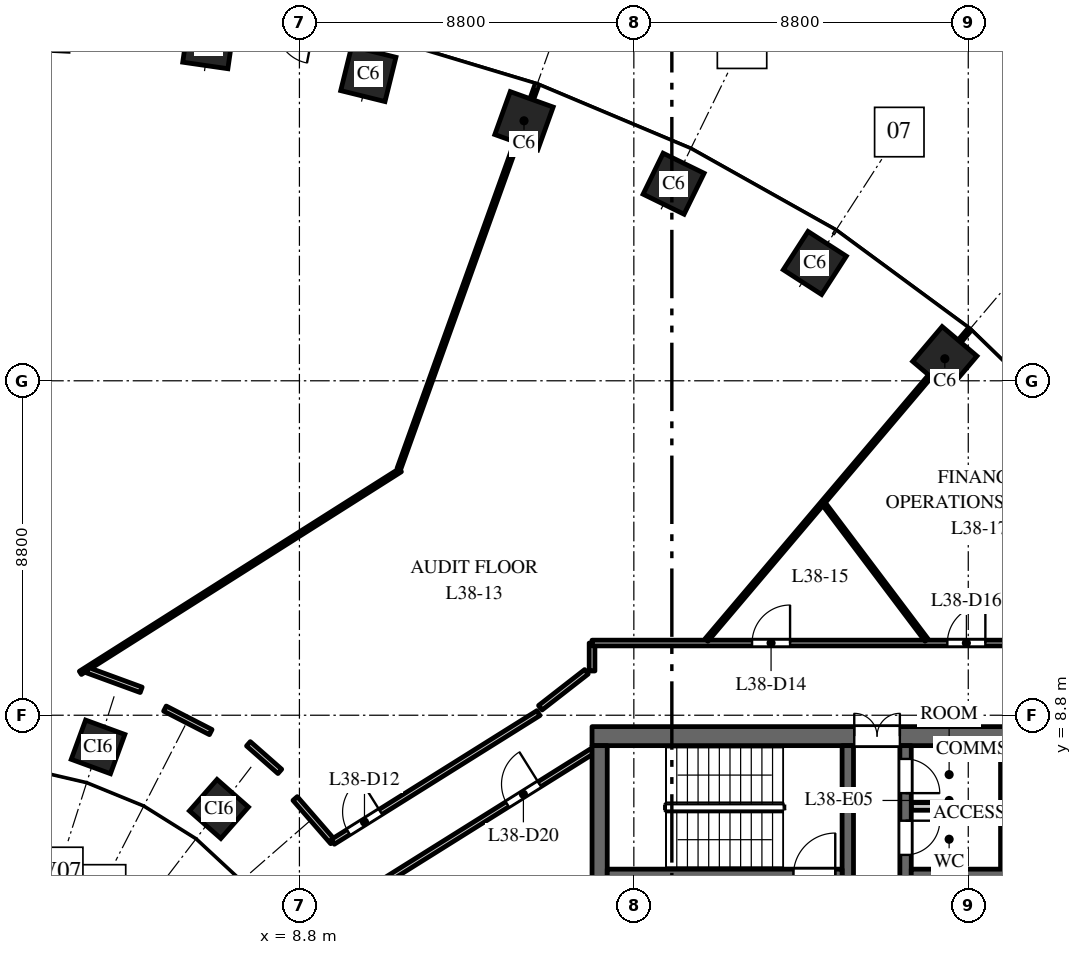
"""IFC4 building model, lengths in metres.
Left out: names, types, materials, properties, quantities, classifications, styles, units other than length and angle.
Written with IfcOpenShell. Run it as: python <this file> out.ifc"""

import sys

from ifc_helpers import new_model, si_unit, direction, frame, frame_2d, origin, origin_2d, place, context, subcontext, project, spatial, rectangle, extrude, element, fill, save


model = new_model("IFC4")
c1 = context("Model", 3, precision=1e-05, world=origin(), true_north=direction((0.0, 1.0)))
c2 = subcontext(c1, "Body", "Model", "MODEL_VIEW")
j1 = project(units=[si_unit("LENGTHUNIT", "METRE"), si_unit("PLANEANGLEUNIT", "RADIAN")], contexts=[c1])
p1 = place(None, origin())
s1 = spatial("IfcSite", under=j1, at=p1, CompositionType="ELEMENT")
p2 = place(p1, origin())
s2 = spatial("IfcBuilding", under=s1, at=p2, CompositionType="ELEMENT")
p3 = place(p2, frame((0.0, 0.0, 166.0)))
s3 = spatial("IfcBuildingStorey", under=s2, at=p3, CompositionType="ELEMENT", Elevation=166.0)
for number, where, z_axis, x_axis in (
    (1, (25.783, 18.18, 0.0), (0.0, 0.0, 1.0), (-0.763, 0.646, 0.0)),
    (2, (22.362, 20.7, 0.0), (0.0, 0.0, 1.0), (-0.84, 0.542, 0.0)),
    (3, (18.646, 22.785, 0.0), (0.0, 0.0, 1.0), (-0.898, 0.439, 0.0)),
    (4, (14.709, 24.441, 0.0), (0.0, 0.0, 1.0), (-0.941, 0.338, 0.0)),
    (5, (10.613, 25.674, 0.0), (0.0, 0.0, 1.0), (-0.971, 0.24, 0.0)),
    (6, (6.409, 26.491, 0.0), (0.0, 0.0, 1.0), (-0.99, 0.143, 0.0)),
):
    element("IfcColumn", number, at=place(p3, frame(where, z_axis=z_axis, x_axis=x_axis)), inside=s3, PredefinedType="COLUMN", context=c2, shape_type="SweptSolid", body=[
        extrude(rectangle(XDim=1.2, YDim=1.2, at=origin_2d()), origin(), (0.0, 0.0, 1.0), 4.0),
    ])
for number, where, z_axis, x_axis in (
    (7, (6.682, 6.334, 0.0), (0.0, 0.0, 1.0), (-0.751, 0.66, 0.0)),
    (8, (3.501, 7.967, 0.0), (0.0, 0.0, 1.0), (-0.939, 0.344, 0.0)),
):
    element("IfcColumn", number, at=place(p3, frame(where, z_axis=z_axis, x_axis=x_axis)), inside=s3, PredefinedType="COLUMN", context=c2, shape_type="SweptSolid", body=[
        extrude(rectangle(XDim=1.1, YDim=1.1, at=origin_2d()), origin(), (0.0, 0.0, 1.0), 4.0),
    ])
p4 = place(p3, frame((16.5, 8.25, 0.0), z_axis=(0.0, 0.0, 1.0), x_axis=(1.0, 0.0, 0.0)))
e9 = element("IfcWall", 9, at=p4, inside=s3, PredefinedType="SHEAR", context=c2, shape_type="SweptSolid", body=[
    extrude(rectangle(XDim=15.0, YDim=0.5, at=frame_2d((7.5, 0.0))), origin(), (0.0, 0.0, 1.0), 3.7),
])
p5 = place(p4, frame((6.9, 0.0, 0.0)))
e10 = element("IfcOpeningElement", 10, at=p5, cuts=e9, PredefinedType="OPENING", context=c2, shape_type="SweptSolid", body=[
    extrude(rectangle(XDim=1.2, YDim=2.1, at=frame_2d((0.6, 1.05))), frame((0.0, 0.26, 0.0), z_axis=(0.0, -1.0, 0.0), x_axis=(1.0, 0.0, 0.0)), (0.0, 0.0, 1.0), 0.52),
])
p6 = place(p4, frame((12.275, 0.0, 0.0)))
e11 = element("IfcOpeningElement", 11, at=p6, cuts=e9, PredefinedType="OPENING", context=c2, shape_type="SweptSolid", body=[
    extrude(rectangle(XDim=0.9, YDim=2.1, at=frame_2d((0.45, 1.05))), frame((0.0, 0.26, 0.0), z_axis=(0.0, -1.0, 0.0), x_axis=(1.0, 0.0, 0.0)), (0.0, 0.0, 1.0), 0.52),
])
p7 = place(p3, frame((24.75, -8.0, 0.0), z_axis=(0.0, 0.0, 1.0), x_axis=(0.0, 1.0, 0.0)))
e12 = element("IfcWall", 12, at=p7, inside=s3, PredefinedType="SHEAR", context=c2, shape_type="SweptSolid", body=[
    extrude(rectangle(XDim=16.0, YDim=0.3, at=frame_2d((8.0, 0.0))), origin(), (0.0, 0.0, 1.0), 3.7),
])
p8 = place(p7, frame((4.425, 0.0, 0.0)))
e13 = element("IfcOpeningElement", 13, at=p8, cuts=e12, PredefinedType="OPENING", context=c2, shape_type="SweptSolid", body=[
    extrude(rectangle(XDim=1.1, YDim=2.1, at=frame_2d((0.55, 1.05))), frame((0.0, 0.16, 0.0), z_axis=(0.0, -1.0, 0.0), x_axis=(1.0, 0.0, 0.0)), (0.0, 0.0, 1.0), 0.32),
])
p9 = place(p7, frame((7.45, 0.0, 0.0)))
e14 = element("IfcOpeningElement", 14, at=p9, cuts=e12, PredefinedType="OPENING", context=c2, shape_type="SweptSolid", body=[
    extrude(rectangle(XDim=1.1, YDim=2.1, at=frame_2d((0.55, 1.05))), frame((0.0, 0.16, 0.0), z_axis=(0.0, -1.0, 0.0), x_axis=(1.0, 0.0, 0.0)), (0.0, 0.0, 1.0), 0.32),
])
p10 = place(p7, frame((10.475, 0.0, 0.0)))
e15 = element("IfcOpeningElement", 15, at=p10, cuts=e12, PredefinedType="OPENING", context=c2, shape_type="SweptSolid", body=[
    extrude(rectangle(XDim=1.1, YDim=2.1, at=frame_2d((0.55, 1.05))), frame((0.0, 0.16, 0.0), z_axis=(0.0, -1.0, 0.0), x_axis=(1.0, 0.0, 0.0)), (0.0, 0.0, 1.0), 0.32),
])
p11 = place(p7, frame((13.125, 0.0, 0.0)))
e16 = element("IfcOpeningElement", 16, at=p11, cuts=e12, PredefinedType="OPENING", context=c2, shape_type="SweptSolid", body=[
    extrude(rectangle(XDim=0.9, YDim=2.1, at=frame_2d((0.45, 1.05))), frame((0.0, 0.16, 0.0), z_axis=(0.0, -1.0, 0.0), x_axis=(1.0, 0.0, 0.0)), (0.0, 0.0, 1.0), 0.32),
])
p12 = place(p7, frame((14.75, 0.0, 0.0)))
e17 = element("IfcOpeningElement", 17, at=p12, cuts=e12, PredefinedType="OPENING", context=c2, shape_type="SweptSolid", body=[
    extrude(rectangle(XDim=0.9, YDim=2.1, at=frame_2d((0.45, 1.05))), frame((0.0, 0.16, 0.0), z_axis=(0.0, -1.0, 0.0), x_axis=(1.0, 0.0, 0.0)), (0.0, 0.0, 1.0), 0.32),
])
p13 = place(p7, frame((1.35, 0.0, 0.0)))
e18 = element("IfcOpeningElement", 18, at=p13, cuts=e12, PredefinedType="OPENING", context=c2, shape_type="SweptSolid", body=[
    extrude(rectangle(XDim=0.9, YDim=2.1, at=frame_2d((0.45, 1.05))), frame((0.0, 0.16, 0.0), z_axis=(0.0, -1.0, 0.0), x_axis=(1.0, 0.0, 0.0)), (0.0, 0.0, 1.0), 0.32),
])
p14 = place(p3, frame((16.7, -8.0, 0.0), z_axis=(0.0, 0.0, 1.0), x_axis=(0.0, 1.0, 0.0)))
e19 = element("IfcWall", 19, at=p14, inside=s3, PredefinedType="SHEAR", context=c2, shape_type="SweptSolid", body=[
    extrude(rectangle(XDim=16.0, YDim=0.4, at=frame_2d((8.0, 0.0))), origin(), (0.0, 0.0, 1.0), 3.7),
])
p15 = place(p3, frame((24.9, 4.6, 0.0), z_axis=(0.0, 0.0, 1.0), x_axis=(1.0, 0.0, 0.0)))
e20 = element("IfcWall", 20, at=p15, inside=s3, PredefinedType="SHEAR", context=c2, shape_type="SweptSolid", body=[
    extrude(rectangle(XDim=6.1, YDim=0.3, at=frame_2d((3.05, 0.0))), origin(), (0.0, 0.0, 1.0), 3.7),
])
p16 = place(p15, frame((4.2, 0.0, 0.0)))
e21 = element("IfcOpeningElement", 21, at=p16, cuts=e20, PredefinedType="OPENING", context=c2, shape_type="SweptSolid", body=[
    extrude(rectangle(XDim=0.9, YDim=2.1, at=frame_2d((0.45, 1.05))), frame((0.0, 0.16, 0.0), z_axis=(0.0, -1.0, 0.0), x_axis=(1.0, 0.0, 0.0)), (0.0, 0.0, 1.0), 0.32),
])
p17 = place(p3, frame((27.35, 4.75, 0.0), z_axis=(0.0, 0.0, 1.0), x_axis=(0.0, 1.0, 0.0)))
e22 = element("IfcWall", 22, at=p17, inside=s3, PredefinedType="PARTITIONING", context=c2, shape_type="SweptSolid", body=[
    extrude(rectangle(XDim=3.25, YDim=0.2, at=frame_2d((1.625, 0.0))), origin(), (0.0, 0.0, 1.0), 3.7),
])
p18 = place(p3, frame((24.9, 6.4, 0.0), z_axis=(0.0, 0.0, 1.0), x_axis=(1.0, 0.0, 0.0)))
e23 = element("IfcWall", 23, at=p18, inside=s3, PredefinedType="PARTITIONING", context=c2, shape_type="SweptSolid", body=[
    extrude(rectangle(XDim=2.35, YDim=0.2, at=frame_2d((1.175, 0.0))), origin(), (0.0, 0.0, 1.0), 3.7),
])
p19 = place(p3, frame((23.23, 2.25, 0.0), z_axis=(0.0, 0.0, 1.0), x_axis=(0.0, 1.0, 0.0)))
e24 = element("IfcWall", 24, at=p19, inside=s3, PredefinedType="SHEAR", context=c2, shape_type="SweptSolid", body=[
    extrude(rectangle(XDim=5.75, YDim=0.3, at=frame_2d((2.875, 0.0))), origin(), (0.0, 0.0, 1.0), 3.7),
])
p20 = place(p19, frame((0.6, 0.0, 0.0)))
e25 = element("IfcOpeningElement", 25, at=p20, cuts=e24, PredefinedType="OPENING", context=c2, shape_type="SweptSolid", body=[
    extrude(rectangle(XDim=1.0, YDim=2.1, at=frame_2d((0.5, 1.05))), frame((0.0, 0.16, 0.0), z_axis=(0.0, -1.0, 0.0), x_axis=(1.0, 0.0, 0.0)), (0.0, 0.0, 1.0), 0.32),
])
p21 = place(p3, frame((16.9, 4.6, 0.0), z_axis=(0.0, 0.0, 1.0), x_axis=(1.0, 0.0, 0.0)))
e26 = element("IfcWall", 26, at=p21, inside=s3, PredefinedType="SHEAR", context=c2, shape_type="SweptSolid", body=[
    extrude(rectangle(XDim=6.18, YDim=0.3, at=frame_2d((3.09, 0.0))), origin(), (0.0, 0.0, 1.0), 3.7),
])
p22 = place(p21, frame((4.9, 0.0, 0.0)))
e27 = element("IfcOpeningElement", 27, at=p22, cuts=e26, PredefinedType="OPENING", context=c2, shape_type="SweptSolid", body=[
    extrude(rectangle(XDim=1.1, YDim=2.1, at=frame_2d((0.55, 1.05))), frame((0.0, 0.16, 0.0), z_axis=(0.0, -1.0, 0.0), x_axis=(1.0, 0.0, 0.0)), (0.0, 0.0, 1.0), 0.32),
])
p23 = place(p3, frame((3.036, 9.915, 0.0), z_axis=(0.0, 0.0, 1.0), x_axis=(0.844792135558, 0.535094615652, 0.0)))
e28 = element("IfcWall", 28, at=p23, inside=s3, PredefinedType="PARTITIONING", context=c2, shape_type="SweptSolid", body=[
    extrude(rectangle(XDim=9.968, YDim=0.1, at=frame_2d((4.984, 0.0))), origin(), (0.0, 0.0, 1.0), 2.85),
])
p24 = place(p3, frame((3.222, 9.986, 0.0), z_axis=(0.0, 0.0, 1.0), x_axis=(0.938967105432, -0.344006940215, 0.0)))
e29 = element("IfcWall", 29, at=p24, inside=s3, PredefinedType="PARTITIONING", context=c2, shape_type="SweptSolid", body=[
    extrude(rectangle(XDim=1.506, YDim=0.15, at=frame_2d((0.753, 0.0))), origin(), (0.0, 0.0, 1.0), 3.7),
])
p25 = place(p3, frame((5.261, 8.975, 0.0), z_axis=(0.0, 0.0, 1.0), x_axis=(0.889472002788, -0.456989667559, 0.0)))
e30 = element("IfcWall", 30, at=p25, inside=s3, PredefinedType="PARTITIONING", context=c2, shape_type="SweptSolid", body=[
    extrude(rectangle(XDim=1.355, YDim=0.15, at=frame_2d((0.677, 0.0))), origin(), (0.0, 0.0, 1.0), 2.85),
])
p26 = place(p3, frame((7.458, 8.049, 0.0), z_axis=(0.0, 0.0, 1.0), x_axis=(0.75060787095, -0.660747927782, 0.0)))
e31 = element("IfcWall", 31, at=p26, inside=s3, PredefinedType="PARTITIONING", context=c2, shape_type="SweptSolid", body=[
    extrude(rectangle(XDim=1.1, YDim=0.15, at=frame_2d((0.55, 0.0))), origin(), (0.0, 0.0, 1.0), 3.7),
])
p27 = place(p3, frame((8.687, 6.609, 0.0), z_axis=(0.0, 0.0, 1.0), x_axis=(0.656454677423, -0.75436546613, 0.0)))
e32 = element("IfcWall", 32, at=p27, inside=s3, PredefinedType="PARTITIONING", context=c2, shape_type="SweptSolid", body=[
    extrude(rectangle(XDim=1.511, YDim=0.15, at=frame_2d((0.755, 0.0))), origin(), (0.0, 0.0, 1.0), 3.7),
])
p28 = place(p3, frame((9.679, 5.469, 0.0), z_axis=(0.0, 0.0, 1.0), x_axis=(0.847602682855, 0.530631408811, 0.0)))
e33 = element("IfcWall", 33, at=p28, inside=s3, PredefinedType="PARTITIONING", context=c2, shape_type="SweptSolid", body=[
    extrude(rectangle(XDim=6.383, YDim=0.15, at=frame_2d((3.191, 0.0))), origin(), (0.0, 0.0, 1.0), 3.7),
])
p29 = place(p28, frame((0.483, 0.0, 0.0)))
e34 = element("IfcOpeningElement", 34, at=p29, cuts=e33, PredefinedType="OPENING", context=c2, shape_type="SweptSolid", body=[
    extrude(rectangle(XDim=1.0, YDim=2.1, at=frame_2d((0.5, 1.05))), frame((0.0, 0.085, 0.0), z_axis=(0.0, -1.0, 0.0), x_axis=(1.0, 0.0, 0.0)), (0.0, 0.0, 1.0), 0.17),
])
p30 = place(p3, frame((10.752, 4.254, 0.0), z_axis=(0.0, 0.0, 1.0), x_axis=(0.847690706888, 0.530490777917, 0.0)))
e35 = element("IfcWall", 35, at=p30, inside=s3, PredefinedType="PARTITIONING", context=c2, shape_type="SweptSolid", body=[
    extrude(rectangle(XDim=6.781, YDim=0.15, at=frame_2d((3.39, 0.0))), origin(), (0.0, 0.0, 1.0), 3.7),
])
p31 = place(p30, frame((4.15, 0.0, 0.0)))
e36 = element("IfcOpeningElement", 36, at=p31, cuts=e35, PredefinedType="OPENING", context=c2, shape_type="SweptSolid", body=[
    extrude(rectangle(XDim=1.0, YDim=2.1, at=frame_2d((0.5, 1.05))), frame((0.0, 0.085, 0.0), z_axis=(0.0, -1.0, 0.0), x_axis=(1.0, 0.0, 0.0)), (0.0, 0.0, 1.0), 0.17),
])
p32 = place(p3, frame((11.417, 15.282, 0.0), z_axis=(0.0, 0.0, 1.0), x_axis=(0.338283704349, 0.941044172912, 0.0)))
e37 = element("IfcWall", 37, at=p32, inside=s3, PredefinedType="PARTITIONING", context=c2, shape_type="SweptSolid", body=[
    extrude(rectangle(XDim=10.734, YDim=0.1, at=frame_2d((5.367, 0.0))), origin(), (0.0, 0.0, 1.0), 2.85),
])
p33 = place(p3, frame((16.5, 9.964, 0.0), z_axis=(0.0, 0.0, 1.0), x_axis=(0.0, 1.0, 0.0)))
e38 = element("IfcWall", 38, at=p33, inside=s3, PredefinedType="PARTITIONING", context=c2, shape_type="SweptSolid", body=[
    extrude(rectangle(XDim=0.736, YDim=0.15, at=frame_2d((0.368, 0.0))), origin(), (0.0, 0.0, 1.0), 3.7),
])
p34 = place(p3, frame((16.5, 10.7, 0.0), z_axis=(0.0, 0.0, 1.0), x_axis=(1.0, 0.0, 0.0)))
e39 = element("IfcWall", 39, at=p34, inside=s3, PredefinedType="PARTITIONING", context=c2, shape_type="SweptSolid", body=[
    extrude(rectangle(XDim=15.0, YDim=0.15, at=frame_2d((7.5, 0.0))), origin(), (0.0, 0.0, 1.0), 2.75),
])
p35 = place(p34, frame((4.211, 0.0, 0.0)))
e40 = element("IfcOpeningElement", 40, at=p35, cuts=e39, PredefinedType="OPENING", context=c2, shape_type="SweptSolid", body=[
    extrude(rectangle(XDim=1.0, YDim=2.1, at=frame_2d((0.5, 1.05))), frame((0.0, 0.085, 0.0), z_axis=(0.0, -1.0, 0.0), x_axis=(1.0, 0.0, 0.0)), (0.0, 0.0, 1.0), 0.17),
])
p36 = place(p34, frame((9.35, 0.0, 0.0)))
e41 = element("IfcOpeningElement", 41, at=p36, cuts=e39, PredefinedType="OPENING", context=c2, shape_type="SweptSolid", body=[
    extrude(rectangle(XDim=1.0, YDim=2.1, at=frame_2d((0.5, 1.05))), frame((0.0, 0.085, 0.0), z_axis=(0.0, -1.0, 0.0), x_axis=(1.0, 0.0, 0.0)), (0.0, 0.0, 1.0), 0.17),
])
p37 = place(p3, frame((19.511, 10.778, 0.0), z_axis=(0.0, 0.0, 1.0), x_axis=(0.646400187952, 0.762998556365, 0.0)))
e42 = element("IfcWall", 42, at=p37, inside=s3, PredefinedType="PARTITIONING", context=c2, shape_type="SweptSolid", body=[
    extrude(rectangle(XDim=10.704, YDim=0.1, at=frame_2d((5.352, 0.0))), origin(), (0.0, 0.0, 1.0), 2.9),
])
p38 = place(p3, frame((22.606, 14.354, 0.0), z_axis=(0.0, 0.0, 1.0), x_axis=(0.602012984229, -0.798486297202, 0.0)))
e43 = element("IfcWall", 43, at=p38, inside=s3, PredefinedType="PARTITIONING", context=c2, shape_type="SweptSolid", body=[
    extrude(rectangle(XDim=4.478, YDim=0.1, at=frame_2d((2.239, 0.0))), origin(), (0.0, 0.0, 1.0), 2.75),
])
p39 = place(p3, frame((15.139, 8.997, 0.0), z_axis=(0.0, 0.0, 1.0), x_axis=(0.788950226826, 0.614457109643, 0.0)))
e44 = element("IfcWall", 44, at=p39, inside=s3, PredefinedType="PARTITIONING", context=c2, shape_type="SweptSolid", body=[
    extrude(rectangle(XDim=1.538, YDim=0.15, at=frame_2d((0.769, 0.0))), origin(), (0.0, 0.0, 1.0), 3.7),
])
p40 = place(p22, origin())
e45 = element("IfcDoor", 45, at=p40, inside=s3, OperationType="SINGLE_SWING_LEFT", PredefinedType="DOOR", context=c2, shape_type="SweptSolid", body=[
    extrude(rectangle(XDim=1.1, YDim=2.1, at=frame_2d((0.55, 1.05))), frame((0.0, 0.025, 0.0), z_axis=(0.0, -1.0, 0.0), x_axis=(1.0, 0.0, 0.0)), (0.0, 0.0, 1.0), 0.05),
])
fill(e27, e45)
p41 = place(p5, origin())
e46 = element("IfcDoor", 46, at=p41, inside=s3, OperationType="DOUBLE_DOOR_DOUBLE_SWING", PredefinedType="DOOR", context=c2, shape_type="SweptSolid", body=[
    extrude(rectangle(XDim=1.2, YDim=2.1, at=frame_2d((0.6, 1.05))), frame((0.0, 0.025, 0.0), z_axis=(0.0, -1.0, 0.0), x_axis=(1.0, 0.0, 0.0)), (0.0, 0.0, 1.0), 0.05),
])
fill(e10, e46)
p42 = place(p11, origin())
e47 = element("IfcDoor", 47, at=p42, inside=s3, OperationType="SINGLE_SWING_RIGHT", PredefinedType="DOOR", context=c2, shape_type="SweptSolid", body=[
    extrude(rectangle(XDim=0.9, YDim=2.1, at=frame_2d((0.45, 1.05))), frame((0.0, 0.025, 0.0), z_axis=(0.0, -1.0, 0.0), x_axis=(1.0, 0.0, 0.0)), (0.0, 0.0, 1.0), 0.05),
])
fill(e16, e47)
p43 = place(p12, origin())
e48 = element("IfcDoor", 48, at=p43, inside=s3, OperationType="SINGLE_SWING_LEFT", PredefinedType="DOOR", context=c2, shape_type="SweptSolid", body=[
    extrude(rectangle(XDim=0.9, YDim=2.1, at=frame_2d((0.45, 1.05))), frame((0.0, 0.025, 0.0), z_axis=(0.0, -1.0, 0.0), x_axis=(1.0, 0.0, 0.0)), (0.0, 0.0, 1.0), 0.05),
])
fill(e17, e48)
p44 = place(p29, origin())
e49 = element("IfcDoor", 49, at=p44, inside=s3, OperationType="SINGLE_SWING_RIGHT", PredefinedType="DOOR", context=c2, shape_type="SweptSolid", body=[
    extrude(rectangle(XDim=1.0, YDim=2.1, at=frame_2d((0.5, 1.05))), frame((0.0, 0.025, 0.0), z_axis=(0.0, -1.0, 0.0), x_axis=(1.0, 0.0, 0.0)), (0.0, 0.0, 1.0), 0.05),
])
fill(e34, e49)
p45 = place(p35, origin())
e50 = element("IfcDoor", 50, at=p45, inside=s3, OperationType="SINGLE_SWING_RIGHT", PredefinedType="DOOR", context=c2, shape_type="SweptSolid", body=[
    extrude(rectangle(XDim=1.0, YDim=2.1, at=frame_2d((0.5, 1.05))), frame((0.0, 0.025, 0.0), z_axis=(0.0, -1.0, 0.0), x_axis=(1.0, 0.0, 0.0)), (0.0, 0.0, 1.0), 0.05),
])
fill(e40, e50)
p46 = place(p36, origin())
e51 = element("IfcDoor", 51, at=p46, inside=s3, OperationType="SINGLE_SWING_RIGHT", PredefinedType="DOOR", context=c2, shape_type="SweptSolid", body=[
    extrude(rectangle(XDim=1.0, YDim=2.1, at=frame_2d((0.5, 1.05))), frame((0.0, 0.025, 0.0), z_axis=(0.0, -1.0, 0.0), x_axis=(1.0, 0.0, 0.0)), (0.0, 0.0, 1.0), 0.05),
])
fill(e41, e51)
p47 = place(p31, origin())
e52 = element("IfcDoor", 52, at=p47, inside=s3, OperationType="SINGLE_SWING_RIGHT", PredefinedType="DOOR", context=c2, shape_type="SweptSolid", body=[
    extrude(rectangle(XDim=1.0, YDim=2.1, at=frame_2d((0.5, 1.05))), frame((0.0, 0.025, 0.0), z_axis=(0.0, -1.0, 0.0), x_axis=(1.0, 0.0, 0.0)), (0.0, 0.0, 1.0), 0.05),
])
fill(e36, e52)
save(model, sys.argv[1])
